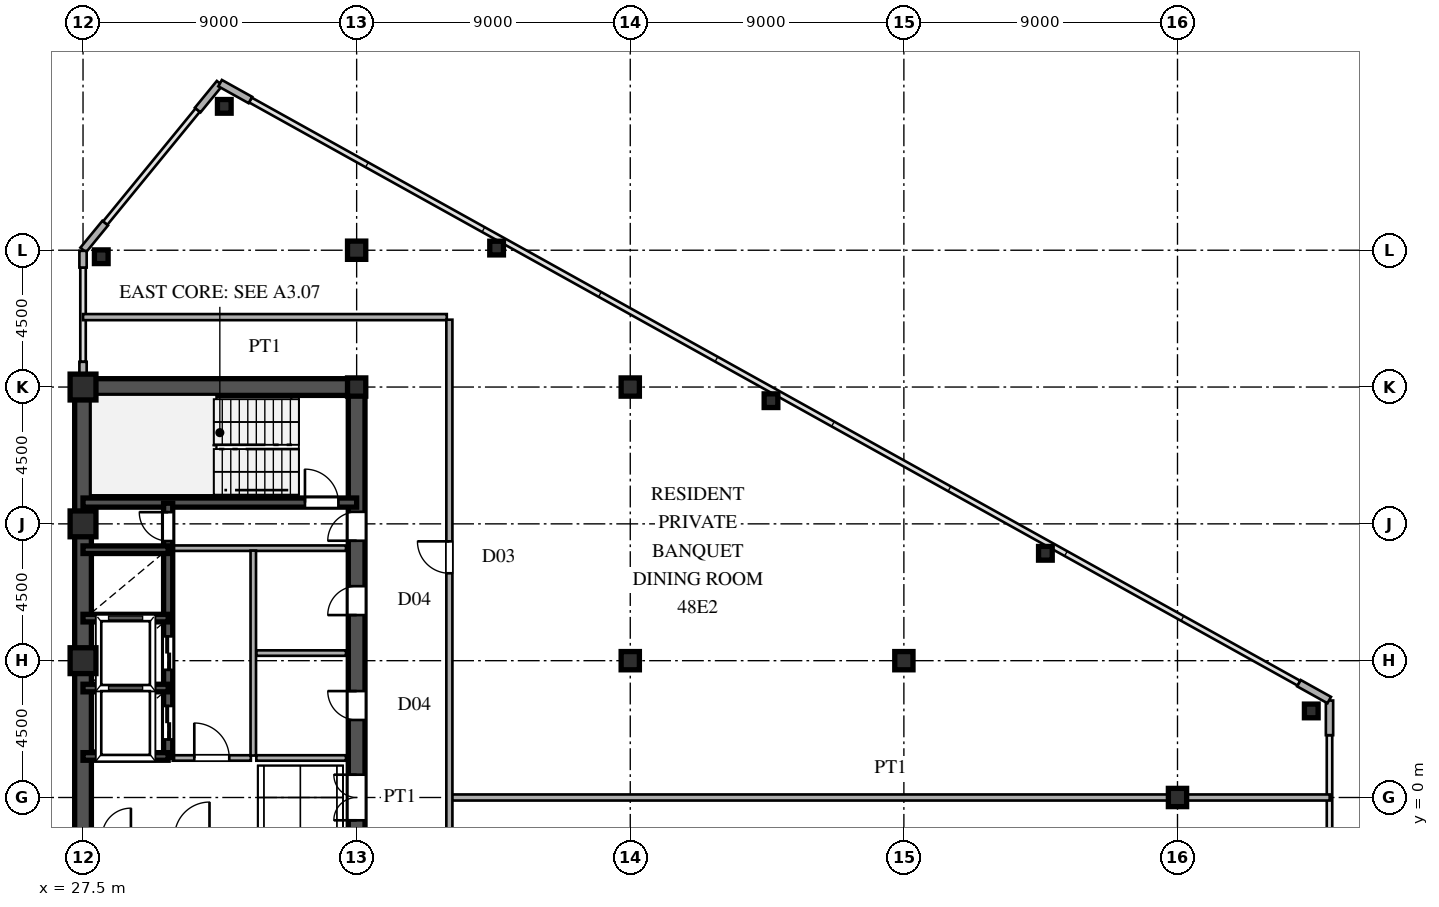
"""IFC4 building model, lengths in metres.
Left out: names, types, materials, properties, quantities, classifications, styles, units other than length and angle.
Written with IfcOpenShell. Run it as: python <this file> out.ifc"""

import sys

from ifc_helpers import new_model, si_unit, direction, frame, frame_2d, origin, origin_2d, place, context, subcontext, project, spatial, rectangle, hollow_rectangle, i_section, extrude, source, transform, mapped, element, fill, save


model = new_model("IFC4")
c1 = context("Model", 3, precision=1e-05, world=origin(), true_north=direction((0.0, 1.0)))
c2 = subcontext(c1, "Body", "Model", "MODEL_VIEW")
j1 = project(units=[si_unit("LENGTHUNIT", "METRE"), si_unit("PLANEANGLEUNIT", "RADIAN")], contexts=[c1])
p1 = place(None, origin())
s1 = spatial("IfcSite", under=j1, at=p1, CompositionType="ELEMENT")
p2 = place(p1, origin())
s2 = spatial("IfcBuilding", under=s1, at=p2, CompositionType="ELEMENT")
p3 = place(p2, frame((0.0, 0.0, 181.5)))
s3 = spatial("IfcBuildingStorey", under=s2, at=p3, CompositionType="ELEMENT", Elevation=181.5)
m1 = source(origin(), c2, "Body", "SweptSolid", [
    extrude(hollow_rectangle(XDim=0.85, YDim=0.85, WallThickness=0.036, at=origin_2d()), origin(), (0.0, 0.0, 1.0), 3.6),
])
for number, where, z_axis, x_axis in (
    (1, (27.5, 4.5, 0.0), (0.0, 0.0, 1.0), (1.0, 0.0, 0.0)),
    (2, (27.5, 9.0, 0.0), (0.0, 0.0, 1.0), (1.0, 0.0, 0.0)),
    (3, (27.5, 13.5, 0.0), (0.0, 0.0, 1.0), (1.0, 0.0, 0.0)),
):
    element("IfcColumn", number, at=place(p3, frame(where, z_axis=z_axis, x_axis=x_axis)), inside=s3, PredefinedType="COLUMN", context=c2, shape_type="MappedRepresentation", body=[
        mapped(m1, transform((0.0, 0.0, 0.0), scale=1.0)),
    ])
m2 = source(origin(), c2, "Body", "SweptSolid", [
    extrude(i_section(OverallWidth=0.6, OverallDepth=0.6, WebThickness=0.025, FlangeThickness=0.04, at=origin_2d()), origin(), (0.0, 0.0, 1.0), 3.6),
])
for number, where, z_axis, x_axis in (
    (4, (36.5, 13.5, 0.0), (0.0, 0.0, 1.0), (1.0, 0.0, 0.0)),
    (5, (36.5, 18.0, 0.0), (0.0, 0.0, 1.0), (1.0, 0.0, 0.0)),
    (6, (45.5, 4.5, 0.0), (0.0, 0.0, 1.0), (1.0, 0.0, 0.0)),
    (7, (45.5, 13.5, 0.0), (0.0, 0.0, 1.0), (1.0, 0.0, 0.0)),
    (8, (54.5, 4.5, 0.0), (0.0, 0.0, 1.0), (1.0, 0.0, 0.0)),
    (9, (63.5, 0.0, 0.0), (0.0, 0.0, 1.0), (1.0, 0.0, 0.0)),
):
    element("IfcColumn", number, at=place(p3, frame(where, z_axis=z_axis, x_axis=x_axis)), inside=s3, PredefinedType="COLUMN", context=c2, shape_type="MappedRepresentation", body=[
        mapped(m2, transform((0.0, 0.0, 0.0), scale=1.0)),
    ])
m3 = source(origin(), c2, "Body", "SweptSolid", [
    extrude(hollow_rectangle(XDim=0.45, YDim=0.45, WallThickness=0.018, at=origin_2d()), origin(), (0.0, 0.0, 1.0), 3.6),
])
for number, where, z_axis, x_axis in (
    (10, (67.9, 2.847, 0.0), (0.0, 0.0, 1.0), (1.0, 0.0, 0.0)),
    (11, (32.147, 22.732, 0.0), (0.0, 0.0, 1.0), (1.0, 0.0, 0.0)),
    (12, (28.1, 17.786, 0.0), (0.0, 0.0, 1.0), (1.0, 0.0, 0.0)),
    (13, (41.104, 18.071, 0.0), (0.0, 0.0, 1.0), (1.0, 0.0, 0.0)),
    (14, (50.129, 13.051, 0.0), (0.0, 0.0, 1.0), (1.0, 0.0, 0.0)),
    (15, (59.155, 8.031, 0.0), (0.0, 0.0, 1.0), (1.0, 0.0, 0.0)),
):
    element("IfcColumn", number, at=place(p3, frame(where, z_axis=z_axis, x_axis=x_axis)), inside=s3, PredefinedType="COLUMN", context=c2, shape_type="MappedRepresentation", body=[
        mapped(m3, transform((0.0, 0.0, 0.0), scale=1.0)),
    ])
for number, where, z_axis, x_axis in (
    (16, (68.5, 2.05, 0.0), (0.0, 0.0, 1.0), (0.0, 1.0, 0.0)),
    (17, (68.491, 3.205, 0.0), (0.0, 0.0, 1.0), (-0.874, 0.486, 0.0)),
    (18, (33.005, 22.941, 0.0), (0.0, 0.0, 1.0), (-0.874, 0.486, 0.0)),
):
    element("IfcWall", number, at=place(p3, frame(where, z_axis=z_axis, x_axis=x_axis)), inside=s3, PredefinedType="SOLIDWALL", context=c2, shape_type="SweptSolid", body=[
        extrude(rectangle(XDim=1.14, YDim=0.24, at=frame_2d((0.57, 0.0))), origin(), (0.0, 0.0, 1.0), 3.38),
    ])
for number, where, z_axis, x_axis in (
    (19, (31.994, 23.492, 0.0), (0.0, 0.0, 1.0), (-0.633, -0.774, 0.0)),
    (20, (28.228, 18.89, 0.0), (0.0, 0.0, 1.0), (-0.633, -0.774, 0.0)),
):
    element("IfcWall", number, at=place(p3, frame(where, z_axis=z_axis, x_axis=x_axis)), inside=s3, PredefinedType="SOLIDWALL", context=c2, shape_type="SweptSolid", body=[
        extrude(rectangle(XDim=1.14, YDim=0.24, at=frame_2d((0.57, 0.0))), origin(), (0.0, 0.0, 1.0), 3.38),
    ])
p4 = place(p3, frame((27.5, 13.78, 0.0), z_axis=(0.0, 0.0, 1.0), x_axis=(0.0, 1.0, 0.0)))
e21 = element("IfcWall", 21, at=p4, inside=s3, PredefinedType="SOLIDWALL", context=c2, shape_type="SweptSolid", body=[
    extrude(rectangle(XDim=0.55, YDim=0.24, at=frame_2d((0.275, 0.0))), origin(), (0.0, 0.0, 1.0), 2.88),
])
p5 = place(p3, frame((27.5, 17.43, 0.0), z_axis=(0.0, 0.0, 1.0), x_axis=(0.0, 1.0, 0.0)))
e22 = element("IfcWall", 22, at=p5, inside=s3, PredefinedType="SOLIDWALL", context=c2, shape_type="SweptSolid", body=[
    extrude(rectangle(XDim=0.55, YDim=0.24, at=frame_2d((0.275, 0.0))), origin(), (0.0, 0.0, 1.0), 3.38),
])
p6 = place(p3, frame((27.5, 1.3, 0.0), z_axis=(0.0, 0.0, 1.0), x_axis=(0.0, 1.0, 0.0)))
e23 = element("IfcWall", 23, at=p6, inside=s3, PredefinedType="SHEAR", context=c2, shape_type="SweptSolid", body=[
    extrude(rectangle(XDim=12.2, YDim=0.55, at=frame_2d((6.1, 0.0))), origin(), (0.0, 0.0, 1.0), 3.38),
])
p7 = place(p3, frame((27.5, -1.3, 0.0), z_axis=(0.0, 0.0, 1.0), x_axis=(0.0, 1.0, 0.0)))
e24 = element("IfcWall", 24, at=p7, inside=s3, PredefinedType="SHEAR", context=c2, shape_type="SweptSolid", body=[
    extrude(rectangle(XDim=2.6, YDim=0.55, at=frame_2d((1.3, 0.0))), origin(), (0.0, 0.0, 1.0), 3.38),
])
p8 = place(p3, frame((27.5, 13.5, 0.0), z_axis=(0.0, 0.0, 1.0), x_axis=(1.0, 0.0, 0.0)))
e25 = element("IfcWall", 25, at=p8, inside=s3, PredefinedType="SHEAR", context=c2, shape_type="SweptSolid", body=[
    extrude(rectangle(XDim=9.0, YDim=0.55, at=frame_2d((4.5, 0.0))), origin(), (0.0, 0.0, 1.0), 3.38),
])
p9 = place(p3, frame((36.5, -1.3, 0.0), z_axis=(0.0, 0.0, 1.0), x_axis=(0.0, 1.0, 0.0)))
e26 = element("IfcWall", 26, at=p9, inside=s3, PredefinedType="SHEAR", context=c2, shape_type="SweptSolid", body=[
    extrude(rectangle(XDim=2.6, YDim=0.55, at=frame_2d((1.3, 0.0))), origin(), (0.0, 0.0, 1.0), 3.38),
])
p10 = place(p9, frame((0.55, 0.0, 0.0)))
e27 = element("IfcOpeningElement", 27, at=p10, cuts=e26, PredefinedType="OPENING", context=c2, shape_type="SweptSolid", body=[
    extrude(rectangle(XDim=1.5, YDim=2.3, at=frame_2d((0.75, 1.15))), frame((0.0, 0.285, 0.0), z_axis=(0.0, -1.0, 0.0), x_axis=(1.0, 0.0, 0.0)), (0.0, 0.0, 1.0), 0.57),
])
p11 = place(p3, frame((36.5, 8.2, 0.0), z_axis=(0.0, 0.0, 1.0), x_axis=(0.0, 1.0, 0.0)))
e28 = element("IfcWall", 28, at=p11, inside=s3, PredefinedType="SHEAR", context=c2, shape_type="SweptSolid", body=[
    extrude(rectangle(XDim=5.45, YDim=0.55, at=frame_2d((2.725, 0.0))), origin(), (0.0, 0.0, 1.0), 3.38),
])
p12 = place(p11, frame((0.245, 0.0, 0.0)))
e29 = element("IfcOpeningElement", 29, at=p12, cuts=e28, PredefinedType="OPENING", context=c2, shape_type="SweptSolid", body=[
    extrude(rectangle(XDim=0.95, YDim=2.15, at=frame_2d((0.475, 1.075))), frame((0.0, 0.285, 0.0), z_axis=(0.0, -1.0, 0.0), x_axis=(1.0, 0.0, 0.0)), (0.0, 0.0, 1.0), 0.57),
])
p13 = place(p3, frame((36.5, 1.3, 0.0), z_axis=(0.0, 0.0, 1.0), x_axis=(0.0, 1.0, 0.0)))
e30 = element("IfcWall", 30, at=p13, inside=s3, PredefinedType="SHEAR", context=c2, shape_type="SweptSolid", body=[
    extrude(rectangle(XDim=3.45, YDim=0.55, at=frame_2d((1.725, 0.0))), origin(), (0.0, 0.0, 1.0), 3.38),
])
p14 = place(p13, frame((1.25, 0.0, 0.0)))
e31 = element("IfcOpeningElement", 31, at=p14, cuts=e30, PredefinedType="OPENING", context=c2, shape_type="SweptSolid", body=[
    extrude(rectangle(XDim=0.95, YDim=2.15, at=frame_2d((0.475, 1.075))), frame((0.0, 0.285, 0.0), z_axis=(0.0, -1.0, 0.0), x_axis=(1.0, 0.0, 0.0)), (0.0, 0.0, 1.0), 0.57),
])
p15 = place(p3, frame((36.5, 4.75, 0.0), z_axis=(0.0, 0.0, 1.0), x_axis=(0.0, 1.0, 0.0)))
e32 = element("IfcWall", 32, at=p15, inside=s3, PredefinedType="SHEAR", context=c2, shape_type="SweptSolid", body=[
    extrude(rectangle(XDim=3.45, YDim=0.55, at=frame_2d((1.725, 0.0))), origin(), (0.0, 0.0, 1.0), 3.38),
])
p16 = place(p15, frame((1.25, 0.0, 0.0)))
e33 = element("IfcOpeningElement", 33, at=p16, cuts=e32, PredefinedType="OPENING", context=c2, shape_type="SweptSolid", body=[
    extrude(rectangle(XDim=0.95, YDim=2.15, at=frame_2d((0.475, 1.075))), frame((0.0, 0.285, 0.0), z_axis=(0.0, -1.0, 0.0), x_axis=(1.0, 0.0, 0.0)), (0.0, 0.0, 1.0), 0.57),
])
p17 = place(p3, frame((27.5, 9.7, 0.0), z_axis=(0.0, 0.0, 1.0), x_axis=(1.0, 0.0, 0.0)))
e34 = element("IfcWall", 34, at=p17, inside=s3, PredefinedType="SHEAR", context=c2, shape_type="SweptSolid", body=[
    extrude(rectangle(XDim=9.0, YDim=0.3, at=frame_2d((4.5, 0.0))), origin(), (0.0, 0.0, 1.0), 3.38),
])
p18 = place(p17, frame((7.3, 0.0, 0.0)))
e35 = element("IfcOpeningElement", 35, at=p18, cuts=e34, PredefinedType="OPENING", context=c2, shape_type="SweptSolid", body=[
    extrude(rectangle(XDim=1.1, YDim=2.2, at=frame_2d((0.55, 1.1))), frame((0.0, 0.16, 0.0), z_axis=(0.0, -1.0, 0.0), x_axis=(1.0, 0.0, 0.0)), (0.0, 0.0, 1.0), 0.32),
])
for number, where, z_axis, x_axis in (
    (36, (27.5, 1.35, 0.0), (0.0, 0.0, 1.0), (1.0, 0.0, 0.0)),
    (37, (27.5, 3.6, 0.0), (0.0, 0.0, 1.0), (1.0, 0.0, 0.0)),
    (38, (27.5, 5.9, 0.0), (0.0, 0.0, 1.0), (1.0, 0.0, 0.0)),
    (39, (27.5, 8.15, 0.0), (0.0, 0.0, 1.0), (1.0, 0.0, 0.0)),
):
    element("IfcWall", number, at=place(p3, frame(where, z_axis=z_axis, x_axis=x_axis)), inside=s3, PredefinedType="SHEAR", context=c2, shape_type="SweptSolid", body=[
        extrude(rectangle(XDim=2.8, YDim=0.25, at=frame_2d((1.4, 0.0))), origin(), (0.0, 0.0, 1.0), 3.38),
    ])
p19 = place(p3, frame((30.3, 1.32, 0.0), z_axis=(0.0, 0.0, 1.0), x_axis=(0.0, 1.0, 0.0)))
e40 = element("IfcWall", 40, at=p19, inside=s3, PredefinedType="SHEAR", context=c2, shape_type="SweptSolid", body=[
    extrude(rectangle(XDim=2.28, YDim=0.3, at=frame_2d((1.14, 0.0))), origin(), (0.0, 0.0, 1.0), 3.38),
])
p20 = place(p19, frame((0.59, 0.0, 0.0)))
e41 = element("IfcOpeningElement", 41, at=p20, cuts=e40, PredefinedType="OPENING", context=c2, shape_type="SweptSolid", body=[
    extrude(rectangle(XDim=1.1, YDim=2.2, at=frame_2d((0.55, 1.1))), frame((0.0, 0.16, 0.0), z_axis=(0.0, -1.0, 0.0), x_axis=(1.0, 0.0, 0.0)), (0.0, 0.0, 1.0), 0.32),
])
p21 = place(p3, frame((30.3, 3.6, 0.0), z_axis=(0.0, 0.0, 1.0), x_axis=(0.0, 1.0, 0.0)))
e42 = element("IfcWall", 42, at=p21, inside=s3, PredefinedType="SHEAR", context=c2, shape_type="SweptSolid", body=[
    extrude(rectangle(XDim=2.3, YDim=0.3, at=frame_2d((1.15, 0.0))), origin(), (0.0, 0.0, 1.0), 3.38),
])
p22 = place(p21, frame((0.6, 0.0, 0.0)))
e43 = element("IfcOpeningElement", 43, at=p22, cuts=e42, PredefinedType="OPENING", context=c2, shape_type="SweptSolid", body=[
    extrude(rectangle(XDim=1.1, YDim=2.2, at=frame_2d((0.55, 1.1))), frame((0.0, 0.16, 0.0), z_axis=(0.0, -1.0, 0.0), x_axis=(1.0, 0.0, 0.0)), (0.0, 0.0, 1.0), 0.32),
])
p23 = place(p3, frame((30.3, 5.9, 0.0), z_axis=(0.0, 0.0, 1.0), x_axis=(0.0, 1.0, 0.0)))
e44 = element("IfcWall", 44, at=p23, inside=s3, PredefinedType="SHEAR", context=c2, shape_type="SweptSolid", body=[
    extrude(rectangle(XDim=2.25, YDim=0.3, at=frame_2d((1.125, 0.0))), origin(), (0.0, 0.0, 1.0), 3.38),
])
p24 = place(p3, frame((30.3, 8.15, 0.0), z_axis=(0.0, 0.0, 1.0), x_axis=(0.0, 1.0, 0.0)))
e45 = element("IfcWall", 45, at=p24, inside=s3, PredefinedType="SHEAR", context=c2, shape_type="SweptSolid", body=[
    extrude(rectangle(XDim=1.53, YDim=0.3, at=frame_2d((0.765, 0.0))), origin(), (0.0, 0.0, 1.0), 3.38),
])
p25 = place(p24, frame((0.285, 0.0, 0.0)))
e46 = element("IfcOpeningElement", 46, at=p25, cuts=e45, PredefinedType="OPENING", context=c2, shape_type="SweptSolid", body=[
    extrude(rectangle(XDim=0.95, YDim=2.15, at=frame_2d((0.475, 1.075))), frame((0.0, 0.16, 0.0), z_axis=(0.0, -1.0, 0.0), x_axis=(1.0, 0.0, 0.0)), (0.0, 0.0, 1.0), 0.32),
])
p26 = place(p3, frame((30.45, 8.2, 0.0), z_axis=(0.0, 0.0, 1.0), x_axis=(1.0, 0.0, 0.0)))
e47 = element("IfcWall", 47, at=p26, inside=s3, PredefinedType="PARTITIONING", context=c2, shape_type="SweptSolid", body=[
    extrude(rectangle(XDim=5.7, YDim=0.18, at=frame_2d((2.85, 0.0))), origin(), (0.0, 0.0, 1.0), 3.38),
])
p27 = place(p3, frame((33.1, 1.38, 0.0), z_axis=(0.0, 0.0, 1.0), x_axis=(0.0, 1.0, 0.0)))
e48 = element("IfcWall", 48, at=p27, inside=s3, PredefinedType="PARTITIONING", context=c2, shape_type="SweptSolid", body=[
    extrude(rectangle(XDim=6.74, YDim=0.18, at=frame_2d((3.37, 0.0))), origin(), (0.0, 0.0, 1.0), 3.38),
])
p28 = place(p3, frame((30.45, 1.3, 0.0), z_axis=(0.0, 0.0, 1.0), x_axis=(1.0, 0.0, 0.0)))
e49 = element("IfcWall", 49, at=p28, inside=s3, PredefinedType="PARTITIONING", context=c2, shape_type="SweptSolid", body=[
    extrude(rectangle(XDim=2.57, YDim=0.18, at=frame_2d((1.285, 0.0))), origin(), (0.0, 0.0, 1.0), 3.38),
])
p29 = place(p28, frame((0.71, 0.0, 0.0)))
e50 = element("IfcOpeningElement", 50, at=p29, cuts=e49, PredefinedType="OPENING", context=c2, shape_type="SweptSolid", body=[
    extrude(rectangle(XDim=1.15, YDim=2.2, at=frame_2d((0.575, 1.1))), frame((0.0, 0.1, 0.0), z_axis=(0.0, -1.0, 0.0), x_axis=(1.0, 0.0, 0.0)), (0.0, 0.0, 1.0), 0.2),
])
for number, where, z_axis, x_axis in (
    (51, (33.2, 1.3, 0.0), (0.0, 0.0, 1.0), (1.0, 0.0, 0.0)),
    (52, (33.2, 4.75, 0.0), (0.0, 0.0, 1.0), (1.0, 0.0, 0.0)),
):
    element("IfcWall", number, at=place(p3, frame(where, z_axis=z_axis, x_axis=x_axis)), inside=s3, PredefinedType="PARTITIONING", context=c2, shape_type="SweptSolid", body=[
        extrude(rectangle(XDim=2.95, YDim=0.18, at=frame_2d((1.475, 0.0))), origin(), (0.0, 0.0, 1.0), 3.38),
    ])
p30 = place(p3, frame((39.63, 0.0, 0.0), z_axis=(0.0, 0.0, 1.0), x_axis=(1.0, 0.0, 0.0)))
e53 = element("IfcWall", 53, at=p30, inside=s3, PredefinedType="PARTITIONING", context=c2, shape_type="SweptSolid", body=[
    extrude(rectangle(XDim=28.875, YDim=0.2, at=frame_2d((14.438, 0.0))), origin(), (0.0, 0.0, 1.0), 3.38),
])
p31 = place(p3, frame((27.5, 15.8, 0.0), z_axis=(0.0, 0.0, 1.0), x_axis=(1.0, 0.0, 0.0)))
e54 = element("IfcWall", 54, at=p31, inside=s3, PredefinedType="PARTITIONING", context=c2, shape_type="SweptSolid", body=[
    extrude(rectangle(XDim=11.965, YDim=0.2, at=frame_2d((5.982, 0.0))), origin(), (0.0, 0.0, 1.0), 3.38),
])
p32 = place(p3, frame((39.55, -15.715, 0.0), z_axis=(0.0, 0.0, 1.0), x_axis=(0.0, 1.0, 0.0)))
e55 = element("IfcWall", 55, at=p32, inside=s3, PredefinedType="PARTITIONING", context=c2, shape_type="SweptSolid", body=[
    extrude(rectangle(XDim=31.43, YDim=0.2, at=frame_2d((15.715, 0.0))), origin(), (0.0, 0.0, 1.0), 3.38),
])
p33 = place(p32, frame((7.29, 0.0, 0.0)))
e56 = element("IfcOpeningElement", 56, at=p33, cuts=e55, PredefinedType="OPENING", context=c2, shape_type="SweptSolid", body=[
    extrude(rectangle(XDim=1.05, YDim=2.25, at=frame_2d((0.525, 1.125))), frame((0.0, 0.11, 0.0), z_axis=(0.0, -1.0, 0.0), x_axis=(1.0, 0.0, 0.0)), (0.0, 0.0, 1.0), 0.22),
])
p34 = place(p32, frame((23.09, 0.0, 0.0)))
e57 = element("IfcOpeningElement", 57, at=p34, cuts=e55, PredefinedType="OPENING", context=c2, shape_type="SweptSolid", body=[
    extrude(rectangle(XDim=1.05, YDim=2.25, at=frame_2d((0.525, 1.125))), frame((0.0, 0.11, 0.0), z_axis=(0.0, -1.0, 0.0), x_axis=(1.0, 0.0, 0.0)), (0.0, 0.0, 1.0), 0.22),
])
m4 = source(origin(), c2, "Body", "SweptSolid", [
    extrude(rectangle(XDim=1.5, YDim=2.3, at=frame_2d((0.75, 1.15))), frame((0.0, 0.025, 0.0), z_axis=(0.0, -1.0, 0.0), x_axis=(1.0, 0.0, 0.0)), (0.0, 0.0, 1.0), 0.05),
])
p35 = place(p10, origin())
e58 = element("IfcDoor", 58, at=p35, inside=s3, OperationType="DOUBLE_SWING_LEFT", PredefinedType="DOOR", context=c2, shape_type="MappedRepresentation", body=[
    mapped(m4, transform((0.0, 0.0, 0.0), scale=1.0)),
])
fill(e27, e58)
m5 = source(origin(), c2, "Body", "SweptSolid", [
    extrude(rectangle(XDim=0.95, YDim=2.15, at=frame_2d((0.475, 1.075))), frame((0.0, 0.025, 0.0), z_axis=(0.0, -1.0, 0.0), x_axis=(1.0, 0.0, 0.0)), (0.0, 0.0, 1.0), 0.05),
])
p36 = place(p12, origin())
e59 = element("IfcDoor", 59, at=p36, inside=s3, OperationType="SINGLE_SWING_LEFT", PredefinedType="DOOR", context=c2, shape_type="MappedRepresentation", body=[
    mapped(m5, transform((0.0, 0.0, 0.0), scale=1.0)),
])
fill(e29, e59)
p37 = place(p14, origin())
e60 = element("IfcDoor", 60, at=p37, inside=s3, OperationType="SINGLE_SWING_RIGHT", PredefinedType="DOOR", context=c2, shape_type="MappedRepresentation", body=[
    mapped(m5, transform((0.0, 0.0, 0.0), scale=1.0)),
])
fill(e31, e60)
p38 = place(p16, origin())
e61 = element("IfcDoor", 61, at=p38, inside=s3, OperationType="SINGLE_SWING_LEFT", PredefinedType="DOOR", context=c2, shape_type="MappedRepresentation", body=[
    mapped(m5, transform((0.0, 0.0, 0.0), scale=1.0)),
])
fill(e33, e61)
m6 = source(origin(), c2, "Body", "SweptSolid", [
    extrude(rectangle(XDim=1.1, YDim=2.2, at=frame_2d((0.55, 1.1))), frame((0.0, 0.025, 0.0), z_axis=(0.0, -1.0, 0.0), x_axis=(1.0, 0.0, 0.0)), (0.0, 0.0, 1.0), 0.05),
])
p39 = place(p18, origin())
e62 = element("IfcDoor", 62, at=p39, inside=s3, OperationType="SINGLE_SWING_LEFT", PredefinedType="DOOR", context=c2, shape_type="MappedRepresentation", body=[
    mapped(m6, transform((0.0, 0.0, 0.0), scale=1.0)),
])
fill(e35, e62)
m7 = source(origin(), c2, "Body", "SweptSolid", [
    extrude(rectangle(XDim=1.1, YDim=2.2, at=frame_2d((0.55, 1.1))), frame((0.0, 0.025, 0.0), z_axis=(0.0, -1.0, 0.0), x_axis=(1.0, 0.0, 0.0)), (0.0, 0.0, 1.0), 0.05),
])
p40 = place(p20, origin())
e63 = element("IfcDoor", 63, at=p40, inside=s3, OperationType="DOUBLE_DOOR_SLIDING", PredefinedType="DOOR", context=c2, shape_type="MappedRepresentation", body=[
    mapped(m7, transform((0.0, 0.0, 0.0), scale=1.0)),
])
fill(e41, e63)
p41 = place(p22, origin())
e64 = element("IfcDoor", 64, at=p41, inside=s3, OperationType="DOUBLE_DOOR_SLIDING", PredefinedType="DOOR", context=c2, shape_type="MappedRepresentation", body=[
    mapped(m7, transform((0.0, 0.0, 0.0), scale=1.0)),
])
fill(e43, e64)
p42 = place(p25, origin())
e65 = element("IfcDoor", 65, at=p42, inside=s3, OperationType="SINGLE_SWING_RIGHT", PredefinedType="DOOR", context=c2, shape_type="MappedRepresentation", body=[
    mapped(m5, transform((0.0, 0.0, 0.0), scale=1.0)),
])
fill(e46, e65)
m8 = source(origin(), c2, "Body", "SweptSolid", [
    extrude(rectangle(XDim=1.15, YDim=2.2, at=frame_2d((0.575, 1.1))), frame((0.0, 0.025, 0.0), z_axis=(0.0, -1.0, 0.0), x_axis=(1.0, 0.0, 0.0)), (0.0, 0.0, 1.0), 0.05),
])
p43 = place(p29, origin())
e66 = element("IfcDoor", 66, at=p43, inside=s3, OperationType="SINGLE_SWING_LEFT", PredefinedType="DOOR", context=c2, shape_type="MappedRepresentation", body=[
    mapped(m8, transform((0.0, 0.0, 0.0), scale=1.0)),
])
fill(e50, e66)
m9 = source(origin(), c2, "Body", "SweptSolid", [
    extrude(rectangle(XDim=1.05, YDim=2.25, at=frame_2d((0.525, 1.125))), frame((0.0, 0.025, 0.0), z_axis=(0.0, -1.0, 0.0), x_axis=(1.0, 0.0, 0.0)), (0.0, 0.0, 1.0), 0.05),
])
p44 = place(p34, origin())
e67 = element("IfcDoor", 67, at=p44, inside=s3, OperationType="SINGLE_SWING_RIGHT", PredefinedType="DOOR", context=c2, shape_type="MappedRepresentation", body=[
    mapped(m9, transform((0.0, 0.0, 0.0), scale=1.0)),
])
fill(e57, e67)
save(model, sys.argv[1])
